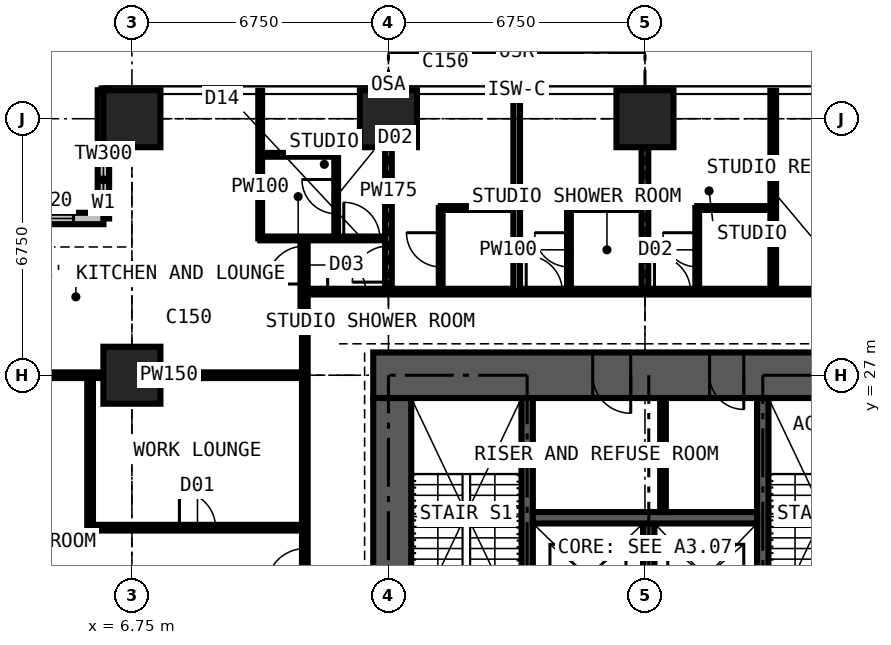
"""IFC4 building model, lengths in metres.
Left out: names, types, materials, properties, quantities, classifications, styles, units other than length and angle.
Written with IfcOpenShell. Run it as: python <this file> out.ifc"""

import sys

from ifc_helpers import new_model, si_unit, direction, frame, frame_2d, origin, origin_2d, place, context, subcontext, project, spatial, rectangle, extrude, element, fill, save


model = new_model("IFC4")
c1 = context("Model", 3, precision=1e-05, world=origin(), true_north=direction((0.0, 1.0)))
c2 = subcontext(c1, "Body", "Model", "MODEL_VIEW")
j1 = project(units=[si_unit("LENGTHUNIT", "METRE"), si_unit("PLANEANGLEUNIT", "RADIAN")], contexts=[c1])
p1 = place(None, origin())
s1 = spatial("IfcSite", under=j1, at=p1, CompositionType="ELEMENT")
p2 = place(p1, origin())
s2 = spatial("IfcBuilding", under=s1, at=p2, CompositionType="ELEMENT")
p3 = place(p2, frame((0.0, 0.0, 160.2)))
s3 = spatial("IfcBuildingStorey", under=s2, at=p3, CompositionType="ELEMENT", Elevation=160.2)
for number, where, z_axis, x_axis in (
    (1, (6.75, 27.0, 0.0), (0.0, 0.0, 1.0), (1.0, 0.0, 0.0)),
    (2, (6.75, 33.75, 0.0), (0.0, 0.0, 1.0), (1.0, 0.0, 0.0)),
    (3, (13.5, 33.75, 0.0), (0.0, 0.0, 1.0), (1.0, 0.0, 0.0)),
    (4, (20.25, 33.75, 0.0), (0.0, 0.0, 1.0), (1.0, 0.0, 0.0)),
):
    element("IfcColumn", number, at=place(p3, frame(where, z_axis=z_axis, x_axis=x_axis)), inside=s3, PredefinedType="COLUMN", context=c2, shape_type="SweptSolid", body=[
        extrude(rectangle(XDim=1.5, YDim=1.5, at=origin_2d()), origin(), (0.0, 0.0, 1.0), 3.6),
    ])
p4 = place(p3, frame((27.4, 27.0, 0.0), z_axis=(0.0, 0.0, 1.0), x_axis=(-1.0, 0.0, 0.0)))
e5 = element("IfcWall", 5, at=p4, inside=s3, PredefinedType="SHEAR", context=c2, shape_type="SweptSolid", body=[
    extrude(rectangle(XDim=14.3, YDim=1.2, at=frame_2d((7.15, 0.0))), origin(), (0.0, 0.0, 1.0), 3.6),
])
p5 = place(p4, frame((4.55, 0.0, 0.0)))
e6 = element("IfcOpeningElement", 6, at=p5, cuts=e5, PredefinedType="OPENING", context=c2, shape_type="SweptSolid", body=[
    extrude(rectangle(XDim=0.9, YDim=2.2, at=frame_2d((0.45, 1.1))), frame((0.0, 0.61, 0.0), z_axis=(0.0, -1.0, 0.0), x_axis=(1.0, 0.0, 0.0)), (0.0, 0.0, 1.0), 1.22),
])
p6 = place(p4, frame((7.525, 0.0, 0.0)))
e7 = element("IfcOpeningElement", 7, at=p6, cuts=e5, PredefinedType="OPENING", context=c2, shape_type="SweptSolid", body=[
    extrude(rectangle(XDim=1.0, YDim=2.2, at=frame_2d((0.5, 1.1))), frame((0.0, 0.61, 0.0), z_axis=(0.0, -1.0, 0.0), x_axis=(1.0, 0.0, 0.0)), (0.0, 0.0, 1.0), 1.22),
])
p7 = place(p3, frame((13.6, 26.4, 0.0), z_axis=(0.0, 0.0, 1.0), x_axis=(0.0, -1.0, 0.0)))
e8 = element("IfcWall", 8, at=p7, inside=s3, PredefinedType="SHEAR", context=c2, shape_type="SweptSolid", body=[
    extrude(rectangle(XDim=12.3, YDim=1.0, at=frame_2d((6.15, 0.0))), origin(), (0.0, 0.0, 1.0), 3.6),
])
p8 = place(p7, frame((7.45, 0.0, 0.0)))
e9 = element("IfcOpeningElement", 9, at=p8, cuts=e8, PredefinedType="OPENING", context=c2, shape_type="SweptSolid", body=[
    extrude(rectangle(XDim=1.2, YDim=2.2, at=frame_2d((0.6, 1.1))), frame((0.0, 0.51, 0.0), z_axis=(0.0, -1.0, 0.0), x_axis=(1.0, 0.0, 0.0)), (0.0, 0.0, 1.0), 1.02),
])
p9 = place(p3, frame((6.0, 34.5, 0.0), z_axis=(0.0, 0.0, 1.0), x_axis=(0.0, -1.0, 0.0)))
e10 = element("IfcWall", 10, at=p9, inside=s3, PredefinedType="SOLIDWALL", context=c2, shape_type="SweptSolid", body=[
    extrude(rectangle(XDim=3.375, YDim=0.3, at=frame_2d((1.688, 0.0))), origin(), (0.0, 0.0, 1.0), 3.375),
])
p10 = place(p9, frame((1.607, 0.0, 0.9)))
e11 = element("IfcOpeningElement", 11, at=p10, cuts=e10, PredefinedType="OPENING", context=c2, shape_type="SweptSolid", body=[
    extrude(rectangle(XDim=1.5, YDim=1.8, at=frame_2d((0.75, 0.9))), frame((0.0, 0.16, 0.0), z_axis=(0.0, -1.0, 0.0), x_axis=(1.0, 0.0, 0.0)), (0.0, 0.0, 1.0), 0.32),
])
p11 = place(p3, frame((6.0, 31.125, 0.0), z_axis=(0.0, 0.0, 1.0), x_axis=(-1.0, 0.0, 0.0)))
e12 = element("IfcWall", 12, at=p11, inside=s3, PredefinedType="SOLIDWALL", context=c2, shape_type="SweptSolid", body=[
    extrude(rectangle(XDim=3.375, YDim=0.3, at=frame_2d((1.688, 0.0))), origin(), (0.0, 0.0, 1.0), 3.375),
])
p12 = place(p11, frame((0.788, 0.0, 0.6)))
e13 = element("IfcOpeningElement", 13, at=p12, cuts=e12, PredefinedType="OPENING", context=c2, shape_type="SweptSolid", body=[
    extrude(rectangle(XDim=1.8, YDim=2.1, at=frame_2d((0.9, 1.05))), frame((0.0, 0.16, 0.0), z_axis=(0.0, -1.0, 0.0), x_axis=(1.0, 0.0, 0.0)), (0.0, 0.0, 1.0), 0.32),
])
for number, where, z_axis, x_axis in (
    (14, (17.15, 20.3, 0.0), (0.0, 0.0, 1.0), (0.0, 1.0, 0.0)),
    (15, (23.35, 20.3, 0.0), (0.0, 0.0, 1.0), (0.0, 1.0, 0.0)),
):
    element("IfcWall", number, at=place(p3, frame(where, z_axis=z_axis, x_axis=x_axis)), inside=s3, PredefinedType="SHEAR", context=c2, shape_type="SweptSolid", body=[
        extrude(rectangle(XDim=6.1, YDim=0.3, at=frame_2d((3.05, 0.0))), origin(), (0.0, 0.0, 1.0), 3.6),
    ])
p13 = place(p3, frame((20.35, 20.3, 0.0), z_axis=(0.0, 0.0, 1.0), x_axis=(0.0, 1.0, 0.0)))
e16 = element("IfcWall", 16, at=p13, inside=s3, PredefinedType="SHEAR", context=c2, shape_type="SweptSolid", body=[
    extrude(rectangle(XDim=2.8, YDim=0.3, at=frame_2d((1.4, 0.0))), origin(), (0.0, 0.0, 1.0), 3.6),
])
p14 = place(p3, frame((17.3, 23.25, 0.0), z_axis=(0.0, 0.0, 1.0), x_axis=(1.0, 0.0, 0.0)))
e17 = element("IfcWall", 17, at=p14, inside=s3, PredefinedType="SHEAR", context=c2, shape_type="SweptSolid", body=[
    extrude(rectangle(XDim=5.9, YDim=0.3, at=frame_2d((2.95, 0.0))), origin(), (0.0, 0.0, 1.0), 3.6),
])
p15 = place(p3, frame((20.725, 23.4, 0.0), z_axis=(0.0, 0.0, 1.0), x_axis=(0.0, 1.0, 0.0)))
e18 = element("IfcWall", 18, at=p15, inside=s3, PredefinedType="PARTITIONING", context=c2, shape_type="SweptSolid", body=[
    extrude(rectangle(XDim=3.0, YDim=0.15, at=frame_2d((1.5, 0.0))), origin(), (0.0, 0.0, 1.0), 3.375),
])
p16 = place(p3, frame((4.15, 27.0, 0.0), z_axis=(0.0, 0.0, 1.0), x_axis=(1.0, 0.0, 0.0)))
e19 = element("IfcWall", 19, at=p16, inside=s3, PredefinedType="PARTITIONING", context=c2, shape_type="SweptSolid", body=[
    extrude(rectangle(XDim=7.15, YDim=0.15, at=frame_2d((3.575, 0.0))), origin(), (0.0, 0.0, 1.0), 2.806),
])
p17 = place(p3, frame((5.65, 22.988, 0.0), z_axis=(0.0, 0.0, 1.0), x_axis=(0.0, 1.0, 0.0)))
e20 = element("IfcWall", 20, at=p17, inside=s3, PredefinedType="PARTITIONING", context=c2, shape_type="SweptSolid", body=[
    extrude(rectangle(XDim=4.012, YDim=0.15, at=frame_2d((2.006, 0.0))), origin(), (0.0, 0.0, 1.0), 3.375),
])
p18 = place(p3, frame((5.65, 22.988, 0.0), z_axis=(0.0, 0.0, 1.0), x_axis=(1.0, 0.0, 0.0)))
e21 = element("IfcWall", 21, at=p18, inside=s3, PredefinedType="PARTITIONING", context=c2, shape_type="SweptSolid", body=[
    extrude(rectangle(XDim=5.65, YDim=0.15, at=frame_2d((2.825, 0.0))), origin(), (0.0, 0.0, 1.0), 3.375),
])
p19 = place(p18, frame((2.35, 0.0, 0.0)))
e22 = element("IfcOpeningElement", 22, at=p19, cuts=e21, PredefinedType="OPENING", context=c2, shape_type="SweptSolid", body=[
    extrude(rectangle(XDim=0.95, YDim=2.2, at=frame_2d((0.475, 1.1))), frame((0.0, 0.085, 0.0), z_axis=(0.0, -1.0, 0.0), x_axis=(1.0, 0.0, 0.0)), (0.0, 0.0, 1.0), 0.17),
])
p20 = place(p3, frame((10.125, 30.6, 0.0), z_axis=(0.0, 0.0, 1.0), x_axis=(0.0, 1.0, 0.0)))
e23 = element("IfcWall", 23, at=p20, inside=s3, PredefinedType="PARTITIONING", context=c2, shape_type="SweptSolid", body=[
    extrude(rectangle(XDim=3.884, YDim=0.1, at=frame_2d((1.942, 0.0))), origin(), (0.0, 0.0, 1.0), 3.375),
])
p21 = place(p3, frame((10.125, 30.6, 0.0), z_axis=(0.0, 0.0, 1.0), x_axis=(1.0, 0.0, 0.0)))
e24 = element("IfcWall", 24, at=p21, inside=s3, PredefinedType="PARTITIONING", context=c2, shape_type="SweptSolid", body=[
    extrude(rectangle(XDim=3.375, YDim=0.1, at=frame_2d((1.688, 0.0))), origin(), (0.0, 0.0, 1.0), 3.375),
])
p22 = place(p21, frame((2.2, 0.0, 0.0)))
e25 = element("IfcOpeningElement", 25, at=p22, cuts=e24, PredefinedType="OPENING", context=c2, shape_type="SweptSolid", body=[
    extrude(rectangle(XDim=0.95, YDim=2.2, at=frame_2d((0.475, 1.1))), frame((0.0, 0.06, 0.0), z_axis=(0.0, -1.0, 0.0), x_axis=(1.0, 0.0, 0.0)), (0.0, 0.0, 1.0), 0.12),
])
p23 = place(p3, frame((10.125, 32.8, 0.0), z_axis=(0.0, 0.0, 1.0), x_axis=(1.0, 0.0, 0.0)))
e26 = element("IfcWall", 26, at=p23, inside=s3, PredefinedType="PARTITIONING", context=c2, shape_type="SweptSolid", body=[
    extrude(rectangle(XDim=2.0, YDim=0.1, at=frame_2d((1.0, 0.0))), origin(), (0.0, 0.0, 1.0), 3.375),
])
p24 = place(p3, frame((11.3, 11.3, 0.0), z_axis=(0.0, 0.0, 1.0), x_axis=(0.0, 1.0, 0.0)))
e27 = element("IfcWall", 27, at=p24, inside=s3, PredefinedType="PARTITIONING", context=c2, shape_type="SweptSolid", body=[
    extrude(rectangle(XDim=19.3, YDim=0.15, at=frame_2d((9.65, 0.0))), origin(), (0.0, 0.0, 1.0), 3.375),
])
p25 = place(p24, frame((18.1, 0.0, 0.0)))
e28 = element("IfcOpeningElement", 28, at=p25, cuts=e27, PredefinedType="OPENING", context=c2, shape_type="SweptSolid", body=[
    extrude(rectangle(XDim=1.0, YDim=2.2, at=frame_2d((0.5, 1.1))), frame((0.0, 0.085, 0.0), z_axis=(0.0, -1.0, 0.0), x_axis=(1.0, 0.0, 0.0)), (0.0, 0.0, 1.0), 0.17),
])
p26 = place(p24, frame((10.137, 0.0, 0.0)))
e29 = element("IfcOpeningElement", 29, at=p26, cuts=e27, PredefinedType="OPENING", context=c2, shape_type="SweptSolid", body=[
    extrude(rectangle(XDim=1.0, YDim=2.2, at=frame_2d((0.5, 1.1))), frame((0.0, 0.085, 0.0), z_axis=(0.0, -1.0, 0.0), x_axis=(1.0, 0.0, 0.0)), (0.0, 0.0, 1.0), 0.17),
])
p27 = place(p3, frame((11.3, 29.2, 0.0), z_axis=(0.0, 0.0, 1.0), x_axis=(1.0, 0.0, 0.0)))
e30 = element("IfcWall", 30, at=p27, inside=s3, PredefinedType="PARTITIONING", context=c2, shape_type="SweptSolid", body=[
    extrude(rectangle(XDim=19.809, YDim=0.15, at=frame_2d((9.904, 0.0))), origin(), (0.0, 0.0, 1.0), 3.375),
])
p28 = place(p27, frame((14.625, 0.0, 0.0)))
e31 = element("IfcOpeningElement", 31, at=p28, cuts=e30, PredefinedType="OPENING", context=c2, shape_type="SweptSolid", body=[
    extrude(rectangle(XDim=1.0, YDim=2.2, at=frame_2d((0.5, 1.1))), frame((0.0, 0.085, 0.0), z_axis=(0.0, -1.0, 0.0), x_axis=(1.0, 0.0, 0.0)), (0.0, 0.0, 1.0), 0.17),
])
p29 = place(p27, frame((5.825, 0.0, 0.0)))
e32 = element("IfcOpeningElement", 32, at=p29, cuts=e30, PredefinedType="OPENING", context=c2, shape_type="SweptSolid", body=[
    extrude(rectangle(XDim=0.95, YDim=2.2, at=frame_2d((0.475, 1.1))), frame((0.0, 0.085, 0.0), z_axis=(0.0, -1.0, 0.0), x_axis=(1.0, 0.0, 0.0)), (0.0, 0.0, 1.0), 0.17),
])
p30 = place(p27, frame((9.2, 0.0, 0.0)))
e33 = element("IfcOpeningElement", 33, at=p30, cuts=e30, PredefinedType="OPENING", context=c2, shape_type="SweptSolid", body=[
    extrude(rectangle(XDim=0.95, YDim=2.2, at=frame_2d((0.475, 1.1))), frame((0.0, 0.085, 0.0), z_axis=(0.0, -1.0, 0.0), x_axis=(1.0, 0.0, 0.0)), (0.0, 0.0, 1.0), 0.17),
])
p31 = place(p27, frame((0.6, 0.0, 0.0)))
e34 = element("IfcOpeningElement", 34, at=p31, cuts=e30, PredefinedType="OPENING", context=c2, shape_type="SweptSolid", body=[
    extrude(rectangle(XDim=1.0, YDim=2.2, at=frame_2d((0.5, 1.1))), frame((0.0, 0.085, 0.0), z_axis=(0.0, -1.0, 0.0), x_axis=(1.0, 0.0, 0.0)), (0.0, 0.0, 1.0), 0.17),
])
p32 = place(p3, frame((12.125, 30.6, 0.0), z_axis=(0.0, 0.0, 1.0), x_axis=(0.0, 1.0, 0.0)))
e35 = element("IfcWall", 35, at=p32, inside=s3, PredefinedType="PARTITIONING", context=c2, shape_type="SweptSolid", body=[
    extrude(rectangle(XDim=2.2, YDim=0.1, at=frame_2d((1.1, 0.0))), origin(), (0.0, 0.0, 1.0), 3.375),
])
p33 = place(p32, frame((0.65, 0.0, 0.0)))
e36 = element("IfcOpeningElement", 36, at=p33, cuts=e35, PredefinedType="OPENING", context=c2, shape_type="SweptSolid", body=[
    extrude(rectangle(XDim=0.9, YDim=2.2, at=frame_2d((0.45, 1.1))), frame((0.0, 0.06, 0.0), z_axis=(0.0, -1.0, 0.0), x_axis=(1.0, 0.0, 0.0)), (0.0, 0.0, 1.0), 0.12),
])
p34 = place(p3, frame((13.5, 29.2, 0.0), z_axis=(0.0, 0.0, 1.0), x_axis=(0.0, 1.0, 0.0)))
e37 = element("IfcWall", 37, at=p34, inside=s3, PredefinedType="PARTITIONING", context=c2, shape_type="SweptSolid", body=[
    extrude(rectangle(XDim=5.284, YDim=0.175, at=frame_2d((2.642, 0.0))), origin(), (0.0, 0.0, 1.0), 2.61),
])
p35 = place(p34, frame((0.25, 0.0, 0.0)))
e38 = element("IfcOpeningElement", 38, at=p35, cuts=e37, PredefinedType="OPENING", context=c2, shape_type="SweptSolid", body=[
    extrude(rectangle(XDim=0.95, YDim=2.2, at=frame_2d((0.475, 1.1))), frame((0.0, 0.097, 0.0), z_axis=(0.0, -1.0, 0.0), x_axis=(1.0, 0.0, 0.0)), (0.0, 0.0, 1.0), 0.195),
])
p36 = place(p3, frame((14.875, 29.2, 0.0), z_axis=(0.0, 0.0, 1.0), x_axis=(0.0, 1.0, 0.0)))
e39 = element("IfcWall", 39, at=p36, inside=s3, PredefinedType="PARTITIONING", context=c2, shape_type="SweptSolid", body=[
    extrude(rectangle(XDim=2.2, YDim=0.1, at=frame_2d((1.1, 0.0))), origin(), (0.0, 0.0, 1.0), 3.375),
])
p37 = place(p36, frame((0.65, 0.0, 0.0)))
e40 = element("IfcOpeningElement", 40, at=p37, cuts=e39, PredefinedType="OPENING", context=c2, shape_type="SweptSolid", body=[
    extrude(rectangle(XDim=0.9, YDim=2.2, at=frame_2d((0.45, 1.1))), frame((0.0, 0.06, 0.0), z_axis=(0.0, -1.0, 0.0), x_axis=(1.0, 0.0, 0.0)), (0.0, 0.0, 1.0), 0.12),
])
p38 = place(p3, frame((14.875, 31.4, 0.0), z_axis=(0.0, 0.0, 1.0), x_axis=(1.0, 0.0, 0.0)))
e41 = element("IfcWall", 41, at=p38, inside=s3, PredefinedType="PARTITIONING", context=c2, shape_type="SweptSolid", body=[
    extrude(rectangle(XDim=2.0, YDim=0.1, at=frame_2d((1.0, 0.0))), origin(), (0.0, 0.0, 1.0), 3.375),
])
p39 = place(p3, frame((16.875, 29.2, 0.0), z_axis=(0.0, 0.0, 1.0), x_axis=(0.0, 1.0, 0.0)))
e42 = element("IfcWall", 42, at=p39, inside=s3, PredefinedType="PARTITIONING", context=c2, shape_type="SweptSolid", body=[
    extrude(rectangle(XDim=5.284, YDim=0.175, at=frame_2d((2.642, 0.0))), origin(), (0.0, 0.0, 1.0), 3.375),
])
p40 = place(p3, frame((18.25, 29.2, 0.0), z_axis=(0.0, 0.0, 1.0), x_axis=(0.0, 1.0, 0.0)))
e43 = element("IfcWall", 43, at=p40, inside=s3, PredefinedType="PARTITIONING", context=c2, shape_type="SweptSolid", body=[
    extrude(rectangle(XDim=2.2, YDim=0.1, at=frame_2d((1.1, 0.0))), origin(), (0.0, 0.0, 1.0), 3.375),
])
p41 = place(p40, frame((0.65, 0.0, 0.0)))
e44 = element("IfcOpeningElement", 44, at=p41, cuts=e43, PredefinedType="OPENING", context=c2, shape_type="SweptSolid", body=[
    extrude(rectangle(XDim=0.9, YDim=2.2, at=frame_2d((0.45, 1.1))), frame((0.0, 0.06, 0.0), z_axis=(0.0, -1.0, 0.0), x_axis=(1.0, 0.0, 0.0)), (0.0, 0.0, 1.0), 0.12),
])
p42 = place(p3, frame((18.25, 31.4, 0.0), z_axis=(0.0, 0.0, 1.0), x_axis=(1.0, 0.0, 0.0)))
e45 = element("IfcWall", 45, at=p42, inside=s3, PredefinedType="PARTITIONING", context=c2, shape_type="SweptSolid", body=[
    extrude(rectangle(XDim=2.0, YDim=0.1, at=frame_2d((1.0, 0.0))), origin(), (0.0, 0.0, 1.0), 3.375),
])
p43 = place(p3, frame((20.25, 29.2, 0.0), z_axis=(0.0, 0.0, 1.0), x_axis=(0.0, 1.0, 0.0)))
e46 = element("IfcWall", 46, at=p43, inside=s3, PredefinedType="PARTITIONING", context=c2, shape_type="SweptSolid", body=[
    extrude(rectangle(XDim=5.284, YDim=0.175, at=frame_2d((2.642, 0.0))), origin(), (0.0, 0.0, 1.0), 2.61),
])
p44 = place(p3, frame((21.625, 29.2, 0.0), z_axis=(0.0, 0.0, 1.0), x_axis=(0.0, 1.0, 0.0)))
e47 = element("IfcWall", 47, at=p44, inside=s3, PredefinedType="PARTITIONING", context=c2, shape_type="SweptSolid", body=[
    extrude(rectangle(XDim=2.2, YDim=0.1, at=frame_2d((1.1, 0.0))), origin(), (0.0, 0.0, 1.0), 3.375),
])
p45 = place(p44, frame((0.65, 0.0, 0.0)))
e48 = element("IfcOpeningElement", 48, at=p45, cuts=e47, PredefinedType="OPENING", context=c2, shape_type="SweptSolid", body=[
    extrude(rectangle(XDim=0.9, YDim=2.2, at=frame_2d((0.45, 1.1))), frame((0.0, 0.06, 0.0), z_axis=(0.0, -1.0, 0.0), x_axis=(1.0, 0.0, 0.0)), (0.0, 0.0, 1.0), 0.12),
])
p46 = place(p3, frame((21.625, 31.4, 0.0), z_axis=(0.0, 0.0, 1.0), x_axis=(1.0, 0.0, 0.0)))
e49 = element("IfcWall", 49, at=p46, inside=s3, PredefinedType="PARTITIONING", context=c2, shape_type="SweptSolid", body=[
    extrude(rectangle(XDim=2.0, YDim=0.1, at=frame_2d((1.0, 0.0))), origin(), (0.0, 0.0, 1.0), 3.375),
])
p47 = place(p3, frame((23.625, 29.2, 0.0), z_axis=(0.0, 0.0, 1.0), x_axis=(0.0, 1.0, 0.0)))
e50 = element("IfcWall", 50, at=p47, inside=s3, PredefinedType="PARTITIONING", context=c2, shape_type="SweptSolid", body=[
    extrude(rectangle(XDim=5.284, YDim=0.15, at=frame_2d((2.642, 0.0))), origin(), (0.0, 0.0, 1.0), 3.375),
])
p48 = place(p10, origin())
e51 = element("IfcWindow", 51, at=p48, inside=s3, PartitioningType="SINGLE_PANEL", PredefinedType="WINDOW", context=c2, shape_type="SweptSolid", body=[
    extrude(rectangle(XDim=1.5, YDim=1.8, at=frame_2d((0.75, 0.9))), frame((0.0, 0.03, 0.0), z_axis=(0.0, -1.0, 0.0), x_axis=(1.0, 0.0, 0.0)), (0.0, 0.0, 1.0), 0.06),
])
fill(e11, e51)
p49 = place(p12, origin())
e52 = element("IfcWindow", 52, at=p49, inside=s3, PartitioningType="SINGLE_PANEL", PredefinedType="WINDOW", context=c2, shape_type="SweptSolid", body=[
    extrude(rectangle(XDim=1.8, YDim=2.1, at=frame_2d((0.9, 1.05))), frame((0.0, 0.03, 0.0), z_axis=(0.0, -1.0, 0.0), x_axis=(1.0, 0.0, 0.0)), (0.0, 0.0, 1.0), 0.06),
])
fill(e13, e52)
p50 = place(p5, origin())
e53 = element("IfcDoor", 53, at=p50, inside=s3, OperationType="SINGLE_SWING_LEFT", PredefinedType="DOOR", context=c2, shape_type="SweptSolid", body=[
    extrude(rectangle(XDim=0.9, YDim=2.2, at=frame_2d((0.45, 1.1))), frame((0.0, 0.4, 0.0), z_axis=(0.0, -1.0, 0.0), x_axis=(1.0, 0.0, 0.0)), (0.0, 0.0, 1.0), 0.8),
])
fill(e6, e53)
p51 = place(p6, origin())
e54 = element("IfcDoor", 54, at=p51, inside=s3, OperationType="SINGLE_SWING_LEFT", PredefinedType="DOOR", context=c2, shape_type="SweptSolid", body=[
    extrude(rectangle(XDim=1.0, YDim=2.2, at=frame_2d((0.5, 1.1))), frame((0.0, 0.025, 0.0), z_axis=(0.0, -1.0, 0.0), x_axis=(1.0, 0.0, 0.0)), (0.0, 0.0, 1.0), 0.05),
])
fill(e7, e54)
p52 = place(p22, origin())
e55 = element("IfcDoor", 55, at=p52, inside=s3, OperationType="SINGLE_SWING_LEFT", PredefinedType="DOOR", context=c2, shape_type="SweptSolid", body=[
    extrude(rectangle(XDim=0.95, YDim=2.2, at=frame_2d((0.475, 1.1))), frame((0.0, 0.025, 0.0), z_axis=(0.0, -1.0, 0.0), x_axis=(1.0, 0.0, 0.0)), (0.0, 0.0, 1.0), 0.05),
])
fill(e25, e55)
p53 = place(p33, origin())
e56 = element("IfcDoor", 56, at=p53, inside=s3, OperationType="SINGLE_SWING_RIGHT", PredefinedType="DOOR", context=c2, shape_type="SweptSolid", body=[
    extrude(rectangle(XDim=0.9, YDim=2.2, at=frame_2d((0.45, 1.1))), frame((0.0, 0.025, 0.0), z_axis=(0.0, -1.0, 0.0), x_axis=(1.0, 0.0, 0.0)), (0.0, 0.0, 1.0), 0.05),
])
fill(e36, e56)
p54 = place(p35, origin())
e57 = element("IfcDoor", 57, at=p54, inside=s3, OperationType="SINGLE_SWING_LEFT", PredefinedType="DOOR", context=c2, shape_type="SweptSolid", body=[
    extrude(rectangle(XDim=0.95, YDim=2.2, at=frame_2d((0.475, 1.1))), frame((0.0, 0.025, 0.0), z_axis=(0.0, -1.0, 0.0), x_axis=(1.0, 0.0, 0.0)), (0.0, 0.0, 1.0), 0.05),
])
fill(e38, e57)
p55 = place(p37, origin())
e58 = element("IfcDoor", 58, at=p55, inside=s3, OperationType="SINGLE_SWING_RIGHT", PredefinedType="DOOR", context=c2, shape_type="SweptSolid", body=[
    extrude(rectangle(XDim=0.9, YDim=2.2, at=frame_2d((0.45, 1.1))), frame((0.0, 0.025, 0.0), z_axis=(0.0, -1.0, 0.0), x_axis=(1.0, 0.0, 0.0)), (0.0, 0.0, 1.0), 0.05),
])
fill(e40, e58)
p56 = place(p29, origin())
e59 = element("IfcDoor", 59, at=p56, inside=s3, OperationType="SINGLE_SWING_LEFT", PredefinedType="DOOR", context=c2, shape_type="SweptSolid", body=[
    extrude(rectangle(XDim=0.95, YDim=2.2, at=frame_2d((0.475, 1.1))), frame((0.0, 0.025, 0.0), z_axis=(0.0, -1.0, 0.0), x_axis=(1.0, 0.0, 0.0)), (0.0, 0.0, 1.0), 0.05),
])
fill(e32, e59)
p57 = place(p41, origin())
e60 = element("IfcDoor", 60, at=p57, inside=s3, OperationType="SINGLE_SWING_RIGHT", PredefinedType="DOOR", context=c2, shape_type="SweptSolid", body=[
    extrude(rectangle(XDim=0.9, YDim=2.2, at=frame_2d((0.45, 1.1))), frame((0.0, 0.025, 0.0), z_axis=(0.0, -1.0, 0.0), x_axis=(1.0, 0.0, 0.0)), (0.0, 0.0, 1.0), 0.05),
])
fill(e44, e60)
p58 = place(p30, origin())
e61 = element("IfcDoor", 61, at=p58, inside=s3, OperationType="SINGLE_SWING_LEFT", PredefinedType="DOOR", context=c2, shape_type="SweptSolid", body=[
    extrude(rectangle(XDim=0.95, YDim=2.2, at=frame_2d((0.475, 1.1))), frame((0.0, 0.025, 0.0), z_axis=(0.0, -1.0, 0.0), x_axis=(1.0, 0.0, 0.0)), (0.0, 0.0, 1.0), 0.05),
])
fill(e33, e61)
p59 = place(p45, origin())
e62 = element("IfcDoor", 62, at=p59, inside=s3, OperationType="SINGLE_SWING_RIGHT", PredefinedType="DOOR", context=c2, shape_type="SweptSolid", body=[
    extrude(rectangle(XDim=0.9, YDim=2.2, at=frame_2d((0.45, 1.1))), frame((0.0, 0.025, 0.0), z_axis=(0.0, -1.0, 0.0), x_axis=(1.0, 0.0, 0.0)), (0.0, 0.0, 1.0), 0.05),
])
fill(e48, e62)
p60 = place(p31, origin())
e63 = element("IfcDoor", 63, at=p60, inside=s3, OperationType="SINGLE_SWING_LEFT", PredefinedType="DOOR", context=c2, shape_type="SweptSolid", body=[
    extrude(rectangle(XDim=1.0, YDim=2.2, at=frame_2d((0.5, 1.1))), frame((0.0, 0.025, 0.0), z_axis=(0.0, -1.0, 0.0), x_axis=(1.0, 0.0, 0.0)), (0.0, 0.0, 1.0), 0.05),
])
fill(e34, e63)
p61 = place(p25, origin())
e64 = element("IfcDoor", 64, at=p61, inside=s3, OperationType="SINGLE_SWING_LEFT", PredefinedType="DOOR", context=c2, shape_type="SweptSolid", body=[
    extrude(rectangle(XDim=1.0, YDim=2.2, at=frame_2d((0.5, 1.1))), frame((0.0, 0.025, 0.0), z_axis=(0.0, -1.0, 0.0), x_axis=(1.0, 0.0, 0.0)), (0.0, 0.0, 1.0), 0.05),
])
fill(e28, e64)
p62 = place(p26, origin())
e65 = element("IfcDoor", 65, at=p62, inside=s3, OperationType="SINGLE_SWING_LEFT", PredefinedType="DOOR", context=c2, shape_type="SweptSolid", body=[
    extrude(rectangle(XDim=1.0, YDim=2.2, at=frame_2d((0.5, 1.1))), frame((0.0, 0.025, 0.0), z_axis=(0.0, -1.0, 0.0), x_axis=(1.0, 0.0, 0.0)), (0.0, 0.0, 1.0), 0.05),
])
fill(e29, e65)
p63 = place(p19, origin())
e66 = element("IfcDoor", 66, at=p63, inside=s3, OperationType="SINGLE_SWING_LEFT", PredefinedType="DOOR", context=c2, shape_type="SweptSolid", body=[
    extrude(rectangle(XDim=0.95, YDim=2.2, at=frame_2d((0.475, 1.1))), frame((0.0, 0.025, 0.0), z_axis=(0.0, -1.0, 0.0), x_axis=(1.0, 0.0, 0.0)), (0.0, 0.0, 1.0), 0.05),
])
fill(e22, e66)
save(model, sys.argv[1])
